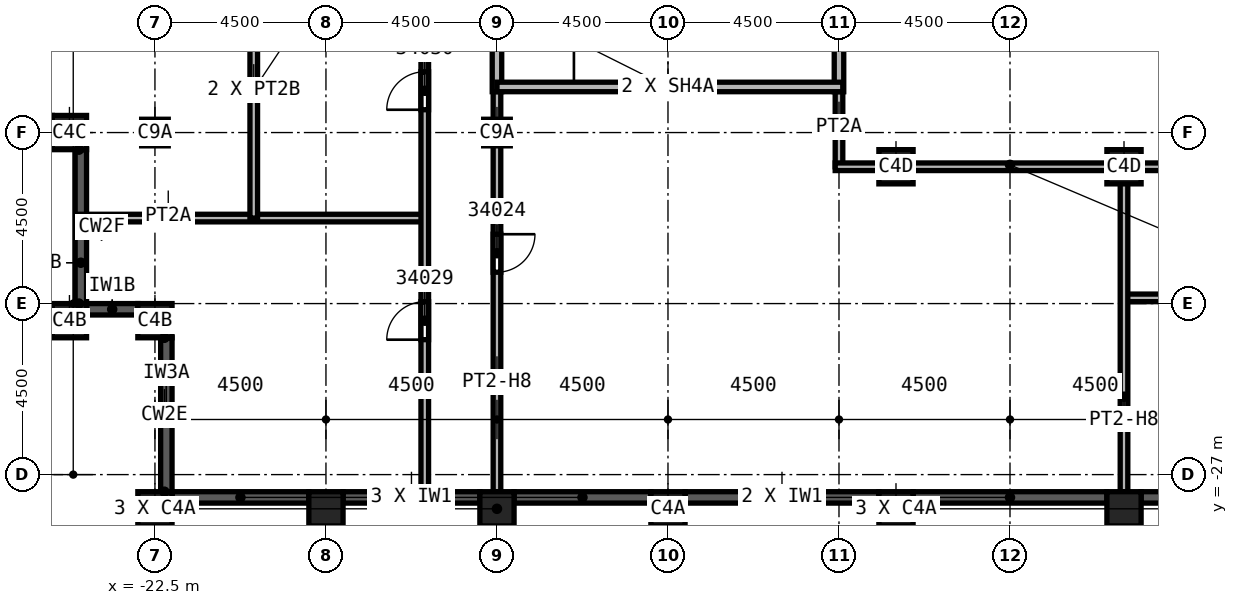
"""IFC4 building model, lengths in metres.
Left out: names, types, materials, properties, quantities, classifications, styles, units other than length and angle.
Written with IfcOpenShell. Run it as: python <this file> out.ifc"""

import sys

from ifc_helpers import new_model, si_unit, direction, frame, frame_2d, origin, origin_2d, place, context, subcontext, project, spatial, polyline, rectangle, outline, extrude, element, fill, save


model = new_model("IFC4")
c1 = context("Model", 3, precision=1e-05, world=origin(), true_north=direction((0.0, 1.0)))
c2 = subcontext(c1, "Body", "Model", "MODEL_VIEW")
j1 = project(units=[si_unit("LENGTHUNIT", "METRE"), si_unit("PLANEANGLEUNIT", "RADIAN")], contexts=[c1])
p1 = place(None, origin())
s1 = spatial("IfcSite", under=j1, at=p1, CompositionType="ELEMENT")
p2 = place(p1, origin())
s2 = spatial("IfcBuilding", under=s1, at=p2, CompositionType="ELEMENT")
p3 = place(p2, frame((0.0, 0.0, 366.0)))
s3 = spatial("IfcBuildingStorey", under=s2, at=p3, CompositionType="ELEMENT", Elevation=366.0)
for number, where, z_axis, x_axis in (
    (1, (-13.5, -18.0, 0.0), (0.0, 0.0, 1.0), (1.0, 0.0, 0.0)),
    (2, (-22.5, -18.0, 0.0), (0.0, 0.0, 1.0), (1.0, 0.0, 0.0)),
):
    element("IfcColumn", number, at=place(p3, frame(where, z_axis=z_axis, x_axis=x_axis)), inside=s3, PredefinedType="COLUMN", context=c2, shape_type="SweptSolid", body=[
        extrude(rectangle(XDim=0.7, YDim=0.7, at=origin_2d()), origin(), (0.0, 0.0, 1.0), 9.532),
    ])
for number, where, z_axis, x_axis in (
    (3, (3.0, -27.9, 0.0), (0.0, 0.0, 1.0), (1.0, 0.0, 0.0)),
    (4, (-3.0, -27.9, 0.0), (0.0, 0.0, 1.0), (1.0, 0.0, 0.0)),
    (5, (-9.0, -27.9, 0.0), (0.0, 0.0, 1.0), (1.0, 0.0, 0.0)),
    (6, (-13.5, -27.9, 0.0), (0.0, 0.0, 1.0), (1.0, 0.0, 0.0)),
    (7, (-18.0, -27.9, 0.0), (0.0, 0.0, 1.0), (1.0, 0.0, 0.0)),
    (8, (-22.5, -27.9, 0.0), (0.0, 0.0, 1.0), (1.0, 0.0, 0.0)),
):
    element("IfcColumn", number, at=place(p3, frame(where, z_axis=z_axis, x_axis=x_axis)), inside=s3, PredefinedType="COLUMN", context=c2, shape_type="SweptSolid", body=[
        extrude(rectangle(XDim=0.9, YDim=0.9, at=origin_2d()), origin(), (0.0, 0.0, 1.0), 4.919),
    ])
for number, where, z_axis, x_axis in (
    (9, (3.0, -18.9, 0.0), (0.0, 0.0, 1.0), (1.0, 0.0, 0.0)),
    (10, (-3.0, -18.9, 0.0), (0.0, 0.0, 1.0), (1.0, 0.0, 0.0)),
):
    element("IfcColumn", number, at=place(p3, frame(where, z_axis=z_axis, x_axis=x_axis)), inside=s3, PredefinedType="COLUMN", context=c2, shape_type="SweptSolid", body=[
        extrude(rectangle(XDim=0.9, YDim=0.9, at=origin_2d()), origin(), (0.0, 0.0, 1.0), 9.113),
    ])
for number, where, z_axis, x_axis in (
    (11, (-22.5, -22.95, 0.0), (0.0, 0.0, 1.0), (1.0, 0.0, 0.0)),
    (12, (-24.75, -22.95, 0.0), (0.0, 0.0, 1.0), (1.0, 0.0, 0.0)),
):
    element("IfcColumn", number, at=place(p3, frame(where, z_axis=z_axis, x_axis=x_axis)), inside=s3, PredefinedType="COLUMN", context=c2, shape_type="SweptSolid", body=[
        extrude(rectangle(XDim=0.9, YDim=0.9, at=origin_2d()), origin(), (0.0, 0.0, 1.0), 7.225),
    ])
p4 = place(p3, frame((-24.75, -18.0, 0.0), z_axis=(0.0, 0.0, 1.0), x_axis=(1.0, 0.0, 0.0)))
e13 = element("IfcColumn", 13, at=p4, inside=s3, PredefinedType="COLUMN", context=c2, shape_type="SweptSolid", body=[
    extrude(rectangle(XDim=0.9, YDim=0.9, at=origin_2d()), origin(), (0.0, 0.0, 1.0), 9.532),
])
p5 = place(p3, frame((-24.45, -18.45, 7.939), z_axis=(0.0, 0.0, 1.0), x_axis=(0.0, -1.0, 0.0)))
e14 = element("IfcWall", 14, at=p5, inside=s3, PredefinedType="SOLIDWALL", context=c2, shape_type="SweptSolid", body=[
    extrude(outline(polyline([(0.0, 0.0), (4.05, 0.0), (4.05, 0.05), (0.0, 1.841), (0.0, 0.0)])), frame((0.0, 0.15, 0.0), z_axis=(0.0, -1.0, 0.0), x_axis=(1.0, 0.0, 0.0)), (0.0, 0.0, 1.0), 0.3),
])
p6 = place(p3, frame((-24.3, -22.65, 0.0), z_axis=(0.0, 0.0, 1.0), x_axis=(1.0, 0.0, 0.0)))
e15 = element("IfcWall", 15, at=p6, inside=s3, PredefinedType="SOLIDWALL", context=c2, shape_type="SweptSolid", body=[
    extrude(rectangle(XDim=1.35, YDim=0.3, at=frame_2d((0.675, 0.0))), origin(), (0.0, 0.0, 1.0), 7.707),
])
p7 = place(p3, frame((-22.2, -23.4, 5.633), z_axis=(0.0, 0.0, 1.0), x_axis=(0.0, -1.0, 0.0)))
e16 = element("IfcWall", 16, at=p7, inside=s3, PredefinedType="SOLIDWALL", context=c2, shape_type="SweptSolid", body=[
    extrude(outline(polyline([(0.0, 0.0), (4.05, 0.0), (4.05, 0.05), (0.0, 1.84), (0.0, 0.0)])), frame((0.0, 0.15, 0.0), z_axis=(0.0, -1.0, 0.0), x_axis=(1.0, 0.0, 0.0)), (0.0, 0.0, 1.0), 0.3),
])
for number, where, z_axis, x_axis in (
    (17, (-22.05, -27.6, 0.0), (0.0, 0.0, 1.0), (1.0, 0.0, 0.0)),
    (18, (-17.55, -27.6, 0.0), (0.0, 0.0, 1.0), (1.0, 0.0, 0.0)),
    (19, (-13.05, -27.6, 0.0), (0.0, 0.0, 1.0), (1.0, 0.0, 0.0)),
):
    element("IfcWall", number, at=place(p3, frame(where, z_axis=z_axis, x_axis=x_axis)), inside=s3, PredefinedType="SOLIDWALL", context=c2, shape_type="SweptSolid", body=[
        extrude(rectangle(XDim=3.6, YDim=0.3, at=frame_2d((1.8, 0.0))), origin(), (0.0, 0.0, 1.0), 5.4),
    ])
for number, where, z_axis, x_axis in (
    (20, (-8.55, -27.6, 0.0), (0.0, 0.0, 1.0), (1.0, 0.0, 0.0)),
    (21, (-2.55, -27.6, 0.0), (0.0, 0.0, 1.0), (1.0, 0.0, 0.0)),
    (22, (3.45, -27.6, 0.0), (0.0, 0.0, 1.0), (1.0, 0.0, 0.0)),
):
    element("IfcWall", number, at=place(p3, frame(where, z_axis=z_axis, x_axis=x_axis)), inside=s3, PredefinedType="SOLIDWALL", context=c2, shape_type="SweptSolid", body=[
        extrude(rectangle(XDim=5.1, YDim=0.3, at=frame_2d((2.55, 0.0))), origin(), (0.0, 0.0, 1.0), 5.4),
    ])
p8 = place(p3, frame((-24.486, -20.25, 0.0), z_axis=(0.0, 0.0, 1.0), x_axis=(1.0, 0.0, 0.0)))
e23 = element("IfcWall", 23, at=p8, inside=s3, PredefinedType="PARTITIONING", context=c2, shape_type="SweptSolid", body=[
    extrude(rectangle(XDim=9.086, YDim=0.2, at=frame_2d((4.543, 0.0))), origin(), (0.0, 0.0, 1.0), 5.76),
])
p9 = place(p3, frame((-19.9, -20.25, 0.0), z_axis=(0.0, 0.0, 1.0), x_axis=(0.0, 1.0, 0.0)))
e24 = element("IfcWall", 24, at=p9, inside=s3, PredefinedType="PARTITIONING", context=c2, shape_type="SweptSolid", body=[
    extrude(rectangle(XDim=13.6, YDim=0.2, at=frame_2d((6.8, 0.0))), origin(), (0.0, 0.0, 1.0), 9.115),
])
p10 = place(p9, frame((7.9, 0.0, 0.0)))
e25 = element("IfcOpeningElement", 25, at=p10, cuts=e24, PredefinedType="OPENING", context=c2, shape_type="SweptSolid", body=[
    extrude(rectangle(XDim=1.0, YDim=2.1, at=frame_2d((0.5, 1.05))), frame((0.0, 0.1, 0.0), z_axis=(0.0, -1.0, 0.0), x_axis=(1.0, 0.0, 0.0)), (0.0, 0.0, 1.0), 0.2),
])
p11 = place(p3, frame((-15.4, -27.45, 0.0), z_axis=(0.0, 0.0, 1.0), x_axis=(0.0, 1.0, 0.0)))
e26 = element("IfcWall", 26, at=p11, inside=s3, PredefinedType="PARTITIONING", context=c2, shape_type="SweptSolid", body=[
    extrude(rectangle(XDim=41.05, YDim=0.2, at=frame_2d((20.525, 0.0))), origin(), (0.0, 0.0, 1.0), 5.76),
])
p12 = place(p11, frame((36.45, 0.0, 0.0)))
e27 = element("IfcOpeningElement", 27, at=p12, cuts=e26, PredefinedType="OPENING", context=c2, shape_type="SweptSolid", body=[
    extrude(rectangle(XDim=1.0, YDim=2.1, at=frame_2d((0.5, 1.05))), frame((0.0, 0.1, 0.0), z_axis=(0.0, -1.0, 0.0), x_axis=(1.0, 0.0, 0.0)), (0.0, 0.0, 1.0), 0.2),
])
p13 = place(p11, frame((4.0, 0.0, 0.0)))
e28 = element("IfcOpeningElement", 28, at=p13, cuts=e26, PredefinedType="OPENING", context=c2, shape_type="SweptSolid", body=[
    extrude(rectangle(XDim=1.0, YDim=2.1, at=frame_2d((0.5, 1.05))), frame((0.0, 0.1, 0.0), z_axis=(0.0, -1.0, 0.0), x_axis=(1.0, 0.0, 0.0)), (0.0, 0.0, 1.0), 0.2),
])
p14 = place(p11, frame((10.05, 0.0, 0.0)))
e29 = element("IfcOpeningElement", 29, at=p14, cuts=e26, PredefinedType="OPENING", context=c2, shape_type="SweptSolid", body=[
    extrude(rectangle(XDim=1.0, YDim=2.1, at=frame_2d((0.5, 1.05))), frame((0.0, 0.1, 0.0), z_axis=(0.0, -1.0, 0.0), x_axis=(1.0, 0.0, 0.0)), (0.0, 0.0, 1.0), 0.2),
])
p15 = place(p11, frame((15.9, 0.0, 0.0)))
e30 = element("IfcOpeningElement", 30, at=p15, cuts=e26, PredefinedType="OPENING", context=c2, shape_type="SweptSolid", body=[
    extrude(rectangle(XDim=1.0, YDim=2.1, at=frame_2d((0.5, 1.05))), frame((0.0, 0.1, 0.0), z_axis=(0.0, -1.0, 0.0), x_axis=(1.0, 0.0, 0.0)), (0.0, 0.0, 1.0), 0.2),
])
p16 = place(p11, frame((20.85, 0.0, 0.0)))
e31 = element("IfcOpeningElement", 31, at=p16, cuts=e26, PredefinedType="OPENING", context=c2, shape_type="SweptSolid", body=[
    extrude(rectangle(XDim=1.0, YDim=2.1, at=frame_2d((0.5, 1.05))), frame((0.0, 0.1, 0.0), z_axis=(0.0, -1.0, 0.0), x_axis=(1.0, 0.0, 0.0)), (0.0, 0.0, 1.0), 0.2),
])
p17 = place(p3, frame((-13.5, -16.675, 0.0), z_axis=(0.0, 0.0, 1.0), x_axis=(0.0, -1.0, 0.0)))
e32 = element("IfcWall", 32, at=p17, inside=s3, PredefinedType="PARTITIONING", context=c2, shape_type="SweptSolid", body=[
    extrude(rectangle(XDim=10.775, YDim=0.2, at=frame_2d((5.387, 0.0))), origin(), (0.0, 0.0, 1.0), 4.916),
])
p18 = place(p17, frame((4.0, 0.0, 0.0)))
e33 = element("IfcOpeningElement", 33, at=p18, cuts=e32, PredefinedType="OPENING", context=c2, shape_type="SweptSolid", body=[
    extrude(rectangle(XDim=1.0, YDim=2.1, at=frame_2d((0.5, 1.05))), frame((0.0, 0.1, 0.0), z_axis=(0.0, -1.0, 0.0), x_axis=(1.0, 0.0, 0.0)), (0.0, 0.0, 1.0), 0.2),
])
p19 = place(p3, frame((-4.5, -18.9, 0.0), z_axis=(0.0, 0.0, 1.0), x_axis=(0.0, 1.0, 0.0)))
e34 = element("IfcWall", 34, at=p19, inside=s3, PredefinedType="PARTITIONING", context=c2, shape_type="SweptSolid", body=[
    extrude(rectangle(XDim=2.1, YDim=0.2, at=frame_2d((1.05, 0.0))), origin(), (0.0, 0.0, 1.0), 5.76),
])
p20 = place(p3, frame((4.5, -18.9, 0.0), z_axis=(0.0, 0.0, 1.0), x_axis=(-1.0, 0.0, 0.0)))
e35 = element("IfcWall", 35, at=p20, inside=s3, PredefinedType="PARTITIONING", context=c2, shape_type="SweptSolid", body=[
    extrude(rectangle(XDim=9.1, YDim=0.2, at=frame_2d((4.55, 0.0))), origin(), (0.0, 0.0, 1.0), 5.76),
])
p21 = place(p3, frame((3.0, -22.35, 0.0), z_axis=(0.0, 0.0, 1.0), x_axis=(1.0, 0.0, 0.0)))
e36 = element("IfcWall", 36, at=p21, inside=s3, PredefinedType="PARTITIONING", context=c2, shape_type="SweptSolid", body=[
    extrude(rectangle(XDim=10.5, YDim=0.2, at=frame_2d((5.25, 0.0))), origin(), (0.0, 0.0, 1.0), 5.76),
])
p22 = place(p3, frame((3.0, -18.9, 0.0), z_axis=(0.0, 0.0, 1.0), x_axis=(0.0, -1.0, 0.0)))
e37 = element("IfcWall", 37, at=p22, inside=s3, PredefinedType="PARTITIONING", context=c2, shape_type="SweptSolid", body=[
    extrude(rectangle(XDim=8.55, YDim=0.2, at=frame_2d((4.275, 0.0))), origin(), (0.0, 0.0, 1.0), 4.916),
])
p23 = place(p3, frame((-13.5, -12.175, 0.0), z_axis=(0.0, 0.0, 1.0), x_axis=(0.0, -1.0, 0.0)))
e38 = element("IfcWall", 38, at=p23, inside=s3, PredefinedType="SOLIDWALL", context=c2, shape_type="SweptSolid", body=[
    extrude(rectangle(XDim=4.75, YDim=0.25, at=frame_2d((2.375, 0.0))), origin(), (0.0, 0.0, 1.0), 5.76),
])
p24 = place(p3, frame((-4.5, -12.3, 0.0), z_axis=(0.0, 0.0, 1.0), x_axis=(0.0, -1.0, 0.0)))
e39 = element("IfcWall", 39, at=p24, inside=s3, PredefinedType="SOLIDWALL", context=c2, shape_type="SweptSolid", body=[
    extrude(rectangle(XDim=4.625, YDim=0.25, at=frame_2d((2.312, 0.0))), origin(), (0.0, 0.0, 1.0), 9.744),
])
p25 = place(p3, frame((-4.4, -16.8, 0.0), z_axis=(0.0, 0.0, 1.0), x_axis=(-1.0, 0.0, 0.0)))
e40 = element("IfcWall", 40, at=p25, inside=s3, PredefinedType="SOLIDWALL", context=c2, shape_type="SweptSolid", body=[
    extrude(rectangle(XDim=9.1, YDim=0.25, at=frame_2d((4.55, 0.0))), origin(), (0.0, 0.0, 1.0), 5.76),
])
p26 = place(p18, origin())
e41 = element("IfcDoor", 41, at=p26, inside=s3, OperationType="SINGLE_SWING_LEFT", PredefinedType="DOOR", context=c2, shape_type="SweptSolid", body=[
    extrude(rectangle(XDim=1.0, YDim=2.1, at=frame_2d((0.5, 1.05))), frame((0.0, 0.025, 0.0), z_axis=(0.0, -1.0, 0.0), x_axis=(1.0, 0.0, 0.0)), (0.0, 0.0, 1.0), 0.05),
])
fill(e33, e41)
p27 = place(p13, origin())
e42 = element("IfcDoor", 42, at=p27, inside=s3, OperationType="SINGLE_SWING_RIGHT", PredefinedType="DOOR", context=c2, shape_type="SweptSolid", body=[
    extrude(rectangle(XDim=1.0, YDim=2.1, at=frame_2d((0.5, 1.05))), frame((0.0, 0.025, 0.0), z_axis=(0.0, -1.0, 0.0), x_axis=(1.0, 0.0, 0.0)), (0.0, 0.0, 1.0), 0.05),
])
fill(e28, e42)
p28 = place(p14, origin())
e43 = element("IfcDoor", 43, at=p28, inside=s3, OperationType="SINGLE_SWING_LEFT", PredefinedType="DOOR", context=c2, shape_type="SweptSolid", body=[
    extrude(rectangle(XDim=1.0, YDim=2.1, at=frame_2d((0.5, 1.05))), frame((0.0, 0.025, 0.0), z_axis=(0.0, -1.0, 0.0), x_axis=(1.0, 0.0, 0.0)), (0.0, 0.0, 1.0), 0.05),
])
fill(e29, e43)
save(model, sys.argv[1])
